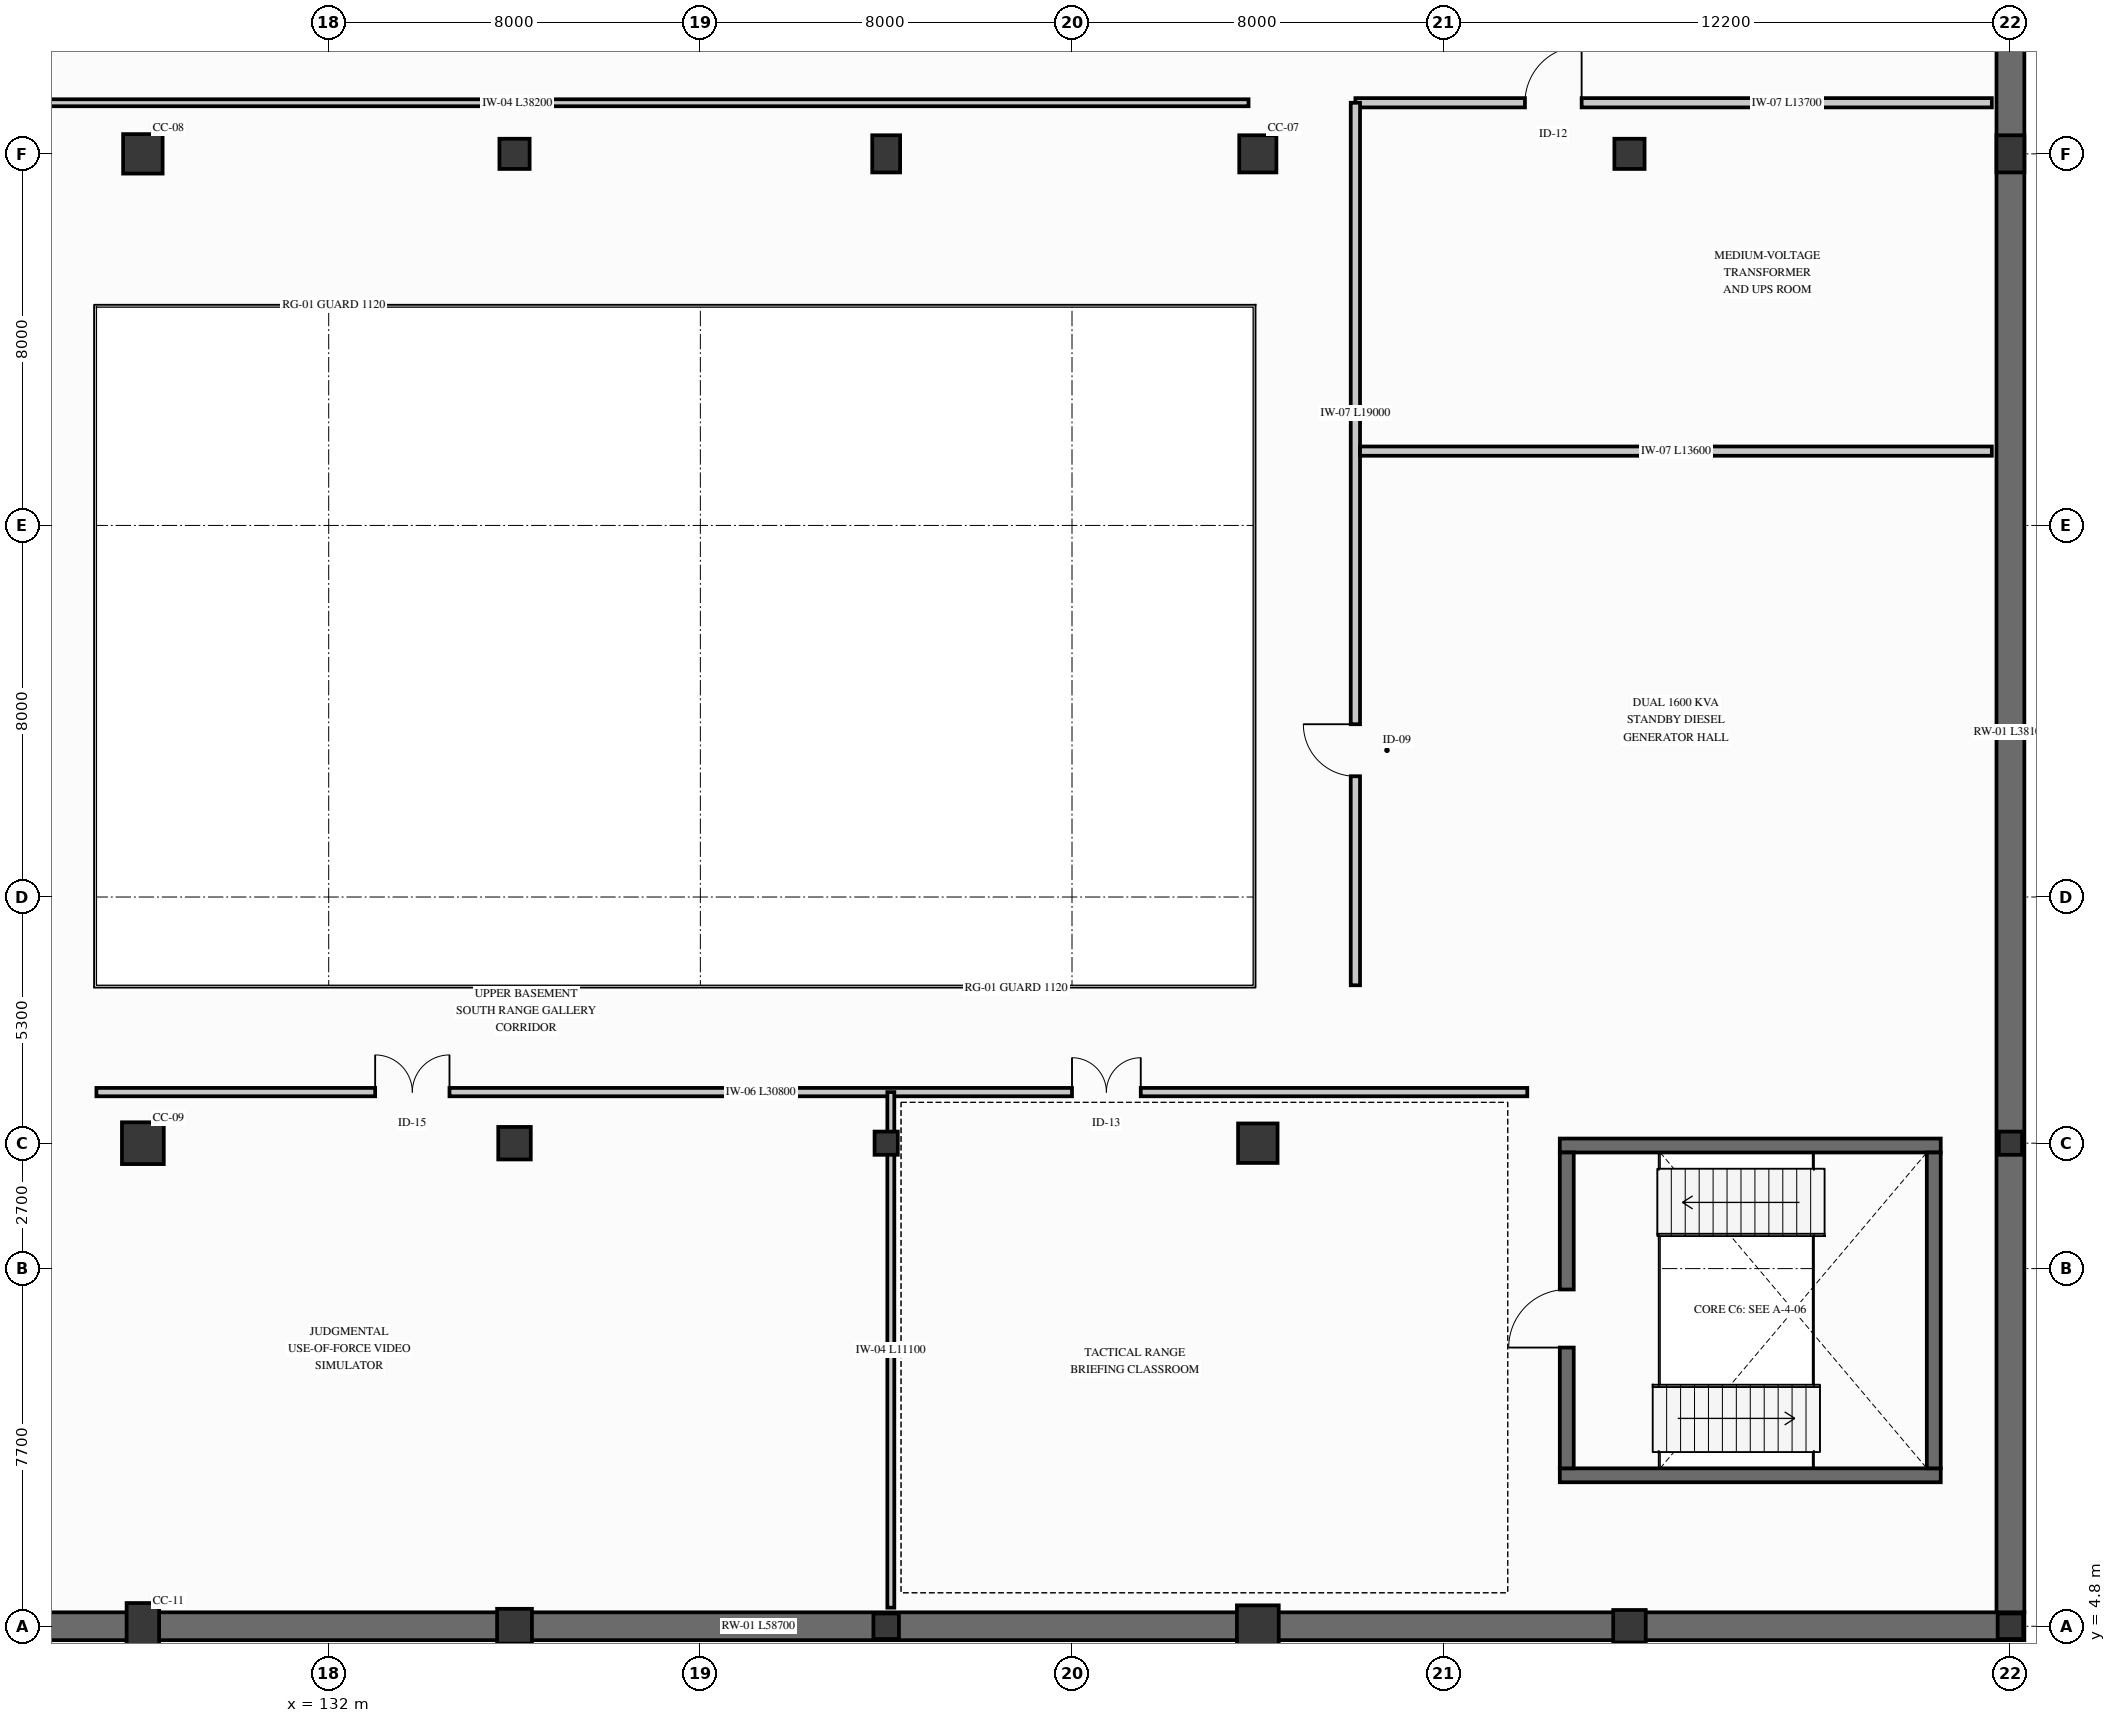
"""IFC4 building model, lengths in metres.
Left out: names, types, materials, properties, quantities, classifications, styles, units other than length and angle.
Written with IfcOpenShell. Run it as: python <this file> out.ifc"""

import sys

from ifc_helpers import new_model, si_unit, direction, frame, frame_2d, origin, origin_2d, place, context, subcontext, project, spatial, rectangle, extrude, element, fill, save


model = new_model("IFC4")
c1 = context("Model", 3, precision=1e-05, world=origin(), true_north=direction((0.0, 1.0)))
c2 = subcontext(c1, "Body", "Model", "MODEL_VIEW")
j1 = project(units=[si_unit("LENGTHUNIT", "METRE"), si_unit("PLANEANGLEUNIT", "RADIAN")], contexts=[c1])
p1 = place(None, origin())
s1 = spatial("IfcSite", under=j1, at=p1, CompositionType="ELEMENT")
p2 = place(p1, origin())
s2 = spatial("IfcBuilding", under=s1, at=p2, CompositionType="ELEMENT")
p3 = place(p2, frame((0.0, 0.0, -4.2)))
s3 = spatial("IfcBuildingStorey", under=s2, at=p3, CompositionType="ELEMENT", Elevation=-4.2)
p4 = place(p3, frame((109.8, 4.8, 0.0), z_axis=(0.0, 0.0, 1.0), x_axis=(1.0, 0.0, 0.0)))
e1 = element("IfcWall", 1, at=p4, inside=s3, PredefinedType="USERDEFINED", context=c2, shape_type="SweptSolid", body=[
    extrude(rectangle(XDim=58.7, YDim=0.6, at=frame_2d((29.35, 0.0))), origin(), (0.0, 0.0, 1.0), 3.94),
])
p5 = place(p3, frame((168.2, 5.1, 0.0), z_axis=(0.0, 0.0, 1.0), x_axis=(0.0, 1.0, 0.0)))
e2 = element("IfcWall", 2, at=p5, inside=s3, PredefinedType="USERDEFINED", context=c2, shape_type="SweptSolid", body=[
    extrude(rectangle(XDim=38.1, YDim=0.6, at=frame_2d((19.05, 0.0))), origin(), (0.0, 0.0, 1.0), 3.94),
])
for number, where, z_axis, x_axis in (
    (3, (158.5, 8.05, 0.0), (0.0, 0.0, 1.0), (1.0, 0.0, 0.0)),
    (4, (158.5, 15.15, 0.0), (0.0, 0.0, 1.0), (1.0, 0.0, 0.0)),
):
    element("IfcWall", number, at=place(p3, frame(where, z_axis=z_axis, x_axis=x_axis)), inside=s3, PredefinedType="SHEAR", context=c2, shape_type="SweptSolid", body=[
        extrude(rectangle(XDim=8.2, YDim=0.3, at=frame_2d((4.1, 0.0))), origin(), (0.0, 0.0, 1.0), 3.9),
    ])
p6 = place(p3, frame((158.65, 8.2, 0.0), z_axis=(0.0, 0.0, 1.0), x_axis=(0.0, 1.0, 0.0)))
e5 = element("IfcWall", 5, at=p6, inside=s3, PredefinedType="SHEAR", context=c2, shape_type="SweptSolid", body=[
    extrude(rectangle(XDim=6.8, YDim=0.3, at=frame_2d((3.4, 0.0))), origin(), (0.0, 0.0, 1.0), 3.9),
])
p7 = place(p6, frame((2.6, 0.0, 0.0)))
e6 = element("IfcOpeningElement", 6, at=p7, cuts=e5, PredefinedType="OPENING", context=c2, shape_type="SweptSolid", body=[
    extrude(rectangle(XDim=1.25, YDim=2.2, at=frame_2d((0.625, 1.1))), frame((0.0, 0.16, 0.0), z_axis=(0.0, -1.0, 0.0), x_axis=(1.0, 0.0, 0.0)), (0.0, 0.0, 1.0), 0.32),
])
p8 = place(p3, frame((166.55, 8.2, 0.0), z_axis=(0.0, 0.0, 1.0), x_axis=(0.0, 1.0, 0.0)))
e7 = element("IfcWall", 7, at=p8, inside=s3, PredefinedType="SHEAR", context=c2, shape_type="SweptSolid", body=[
    extrude(rectangle(XDim=6.8, YDim=0.3, at=frame_2d((3.4, 0.0))), origin(), (0.0, 0.0, 1.0), 3.9),
])
p9 = place(p3, frame((128.0, 4.8, 0.0), z_axis=(0.0, 0.0, 1.0), x_axis=(1.0, 0.0, 0.0)))
e8 = element("IfcColumn", 8, at=p9, inside=s3, PredefinedType="COLUMN", context=c2, shape_type="SweptSolid", body=[
    extrude(rectangle(XDim=0.7, YDim=1.0, at=origin_2d()), origin(), (0.0, 0.0, 1.0), 4.2),
])
p10 = place(p3, frame((128.0, 15.2, 0.0), z_axis=(0.0, 0.0, 1.0), x_axis=(1.0, 0.0, 0.0)))
e9 = element("IfcColumn", 9, at=p10, inside=s3, PredefinedType="COLUMN", context=c2, shape_type="SweptSolid", body=[
    extrude(rectangle(XDim=0.9, YDim=0.9, at=origin_2d()), origin(), (0.0, 0.0, 1.0), 4.2),
])
p11 = place(p3, frame((128.0, 36.5, 0.0), z_axis=(0.0, 0.0, 1.0), x_axis=(1.0, 0.0, 0.0)))
e10 = element("IfcColumn", 10, at=p11, inside=s3, PredefinedType="COLUMN", context=c2, shape_type="SweptSolid", body=[
    extrude(rectangle(XDim=0.85, YDim=0.85, at=origin_2d()), origin(), (0.0, 0.0, 1.0), 4.2),
])
p12 = place(p3, frame((136.0, 4.8, 0.0), z_axis=(0.0, 0.0, 1.0), x_axis=(1.0, 0.0, 0.0)))
e11 = element("IfcColumn", 11, at=p12, inside=s3, PredefinedType="COLUMN", context=c2, shape_type="SweptSolid", body=[
    extrude(rectangle(XDim=0.75, YDim=0.75, at=origin_2d()), origin(), (0.0, 0.0, 1.0), 4.2),
])
p13 = place(p3, frame((136.0, 15.2, 0.0), z_axis=(0.0, 0.0, 1.0), x_axis=(1.0, 0.0, 0.0)))
e12 = element("IfcColumn", 12, at=p13, inside=s3, PredefinedType="COLUMN", context=c2, shape_type="SweptSolid", body=[
    extrude(rectangle(XDim=0.7, YDim=0.7, at=origin_2d()), origin(), (0.0, 0.0, 1.0), 4.2),
])
p14 = place(p3, frame((136.0, 36.5, 0.0), z_axis=(0.0, 0.0, 1.0), x_axis=(1.0, 0.0, 0.0)))
e13 = element("IfcColumn", 13, at=p14, inside=s3, PredefinedType="COLUMN", context=c2, shape_type="SweptSolid", body=[
    extrude(rectangle(XDim=0.65, YDim=0.65, at=origin_2d()), origin(), (0.0, 0.0, 1.0), 4.2),
])
p15 = place(p3, frame((144.0, 4.8, 0.0), z_axis=(0.0, 0.0, 1.0), x_axis=(1.0, 0.0, 0.0)))
e14 = element("IfcColumn", 14, at=p15, inside=s3, PredefinedType="COLUMN", context=c2, shape_type="SweptSolid", body=[
    extrude(rectangle(XDim=0.55, YDim=0.55, at=origin_2d()), origin(), (0.0, 0.0, 1.0), 4.2),
])
p16 = place(p3, frame((144.0, 15.2, 0.0), z_axis=(0.0, 0.0, 1.0), x_axis=(1.0, 0.0, 0.0)))
e15 = element("IfcColumn", 15, at=p16, inside=s3, PredefinedType="COLUMN", context=c2, shape_type="SweptSolid", body=[
    extrude(rectangle(XDim=0.5, YDim=0.5, at=origin_2d()), origin(), (0.0, 0.0, 1.0), 4.2),
])
p17 = place(p3, frame((144.0, 36.5, 0.0), z_axis=(0.0, 0.0, 1.0), x_axis=(1.0, 0.0, 0.0)))
e16 = element("IfcColumn", 16, at=p17, inside=s3, PredefinedType="COLUMN", context=c2, shape_type="SweptSolid", body=[
    extrude(rectangle(XDim=0.6, YDim=0.8, at=origin_2d()), origin(), (0.0, 0.0, 1.0), 4.2),
])
p18 = place(p3, frame((152.0, 4.8, 0.0), z_axis=(0.0, 0.0, 1.0), x_axis=(1.0, 0.0, 0.0)))
e17 = element("IfcColumn", 17, at=p18, inside=s3, PredefinedType="COLUMN", context=c2, shape_type="SweptSolid", body=[
    extrude(rectangle(XDim=0.9, YDim=0.9, at=origin_2d()), origin(), (0.0, 0.0, 1.0), 4.2),
])
p19 = place(p3, frame((152.0, 15.2, 0.0), z_axis=(0.0, 0.0, 1.0), x_axis=(1.0, 0.0, 0.0)))
e18 = element("IfcColumn", 18, at=p19, inside=s3, PredefinedType="COLUMN", context=c2, shape_type="SweptSolid", body=[
    extrude(rectangle(XDim=0.85, YDim=0.85, at=origin_2d()), origin(), (0.0, 0.0, 1.0), 4.2),
])
p20 = place(p3, frame((152.0, 36.5, 0.0), z_axis=(0.0, 0.0, 1.0), x_axis=(1.0, 0.0, 0.0)))
e19 = element("IfcColumn", 19, at=p20, inside=s3, PredefinedType="COLUMN", context=c2, shape_type="SweptSolid", body=[
    extrude(rectangle(XDim=0.8, YDim=0.8, at=origin_2d()), origin(), (0.0, 0.0, 1.0), 4.2),
])
p21 = place(p3, frame((160.0, 4.8, 0.0), z_axis=(0.0, 0.0, 1.0), x_axis=(1.0, 0.0, 0.0)))
e20 = element("IfcColumn", 20, at=p21, inside=s3, PredefinedType="COLUMN", context=c2, shape_type="SweptSolid", body=[
    extrude(rectangle(XDim=0.7, YDim=0.7, at=origin_2d()), origin(), (0.0, 0.0, 1.0), 4.2),
])
p22 = place(p3, frame((160.0, 36.5, 0.0), z_axis=(0.0, 0.0, 1.0), x_axis=(1.0, 0.0, 0.0)))
e21 = element("IfcColumn", 21, at=p22, inside=s3, PredefinedType="COLUMN", context=c2, shape_type="SweptSolid", body=[
    extrude(rectangle(XDim=0.65, YDim=0.65, at=origin_2d()), origin(), (0.0, 0.0, 1.0), 4.2),
])
p23 = place(p3, frame((168.2, 4.8, 0.0), z_axis=(0.0, 0.0, 1.0), x_axis=(1.0, 0.0, 0.0)))
e22 = element("IfcColumn", 22, at=p23, inside=s3, PredefinedType="COLUMN", context=c2, shape_type="SweptSolid", body=[
    extrude(rectangle(XDim=0.55, YDim=0.55, at=origin_2d()), origin(), (0.0, 0.0, 1.0), 4.2),
])
p24 = place(p3, frame((168.2, 15.2, 0.0), z_axis=(0.0, 0.0, 1.0), x_axis=(1.0, 0.0, 0.0)))
e23 = element("IfcColumn", 23, at=p24, inside=s3, PredefinedType="COLUMN", context=c2, shape_type="SweptSolid", body=[
    extrude(rectangle(XDim=0.5, YDim=0.5, at=origin_2d()), origin(), (0.0, 0.0, 1.0), 4.2),
])
p25 = place(p3, frame((168.2, 36.5, 0.0), z_axis=(0.0, 0.0, 1.0), x_axis=(1.0, 0.0, 0.0)))
e24 = element("IfcColumn", 24, at=p25, inside=s3, PredefinedType="COLUMN", context=c2, shape_type="SweptSolid", body=[
    extrude(rectangle(XDim=0.6, YDim=0.8, at=origin_2d()), origin(), (0.0, 0.0, 1.0), 4.2),
])
p26 = place(p3, frame((113.6, 37.6, 0.0), z_axis=(0.0, 0.0, 1.0), x_axis=(1.0, 0.0, 0.0)))
e25 = element("IfcWall", 25, at=p26, inside=s3, PredefinedType="PARTITIONING", context=c2, shape_type="SweptSolid", body=[
    extrude(rectangle(XDim=38.2, YDim=0.15, at=frame_2d((19.1, 0.0))), origin(), (0.0, 0.0, 1.0), 3.088),
])
p27 = place(p26, frame((1.8, 0.0, 0.0)))
e26 = element("IfcOpeningElement", 26, at=p27, cuts=e25, PredefinedType="OPENING", context=c2, shape_type="SweptSolid", body=[
    extrude(rectangle(XDim=0.88, YDim=2.1, at=frame_2d((0.44, 1.05))), frame((0.0, 0.085, 0.0), z_axis=(0.0, -1.0, 0.0), x_axis=(1.0, 0.0, 0.0)), (0.0, 0.0, 1.0), 0.17),
])
p28 = place(p26, frame((5.8, 0.0, 0.0)))
e27 = element("IfcOpeningElement", 27, at=p28, cuts=e25, PredefinedType="OPENING", context=c2, shape_type="SweptSolid", body=[
    extrude(rectangle(XDim=0.92, YDim=2.12, at=frame_2d((0.46, 1.06))), frame((0.0, 0.085, 0.0), z_axis=(0.0, -1.0, 0.0), x_axis=(1.0, 0.0, 0.0)), (0.0, 0.0, 1.0), 0.17),
])
p29 = place(p3, frame((154.1, 37.6, 0.0), z_axis=(0.0, 0.0, 1.0), x_axis=(1.0, 0.0, 0.0)))
e28 = element("IfcWall", 28, at=p29, inside=s3, PredefinedType="PARTITIONING", context=c2, shape_type="SweptSolid", body=[
    extrude(rectangle(XDim=13.7, YDim=0.2, at=frame_2d((6.85, 0.0))), origin(), (0.0, 0.0, 1.0), 3.088),
])
p30 = place(p29, frame((3.65, 0.0, 0.0)))
e29 = element("IfcOpeningElement", 29, at=p30, cuts=e28, PredefinedType="OPENING", context=c2, shape_type="SweptSolid", body=[
    extrude(rectangle(XDim=1.22, YDim=2.25, at=frame_2d((0.61, 1.125))), frame((0.0, 0.11, 0.0), z_axis=(0.0, -1.0, 0.0), x_axis=(1.0, 0.0, 0.0)), (0.0, 0.0, 1.0), 0.22),
])
p31 = place(p3, frame((127.0, 16.3, 0.0), z_axis=(0.0, 0.0, 1.0), x_axis=(1.0, 0.0, 0.0)))
e30 = element("IfcWall", 30, at=p31, inside=s3, PredefinedType="PARTITIONING", context=c2, shape_type="SweptSolid", body=[
    extrude(rectangle(XDim=30.8, YDim=0.18, at=frame_2d((15.4, 0.0))), origin(), (0.0, 0.0, 1.0), 3.088),
])
p32 = place(p31, frame((6.0, 0.0, 0.0)))
e31 = element("IfcOpeningElement", 31, at=p32, cuts=e30, PredefinedType="OPENING", context=c2, shape_type="SweptSolid", body=[
    extrude(rectangle(XDim=1.6, YDim=2.3, at=frame_2d((0.8, 1.15))), frame((0.0, 0.1, 0.0), z_axis=(0.0, -1.0, 0.0), x_axis=(1.0, 0.0, 0.0)), (0.0, 0.0, 1.0), 0.2),
])
p33 = place(p31, frame((21.0, 0.0, 0.0)))
e32 = element("IfcOpeningElement", 32, at=p33, cuts=e30, PredefinedType="OPENING", context=c2, shape_type="SweptSolid", body=[
    extrude(rectangle(XDim=1.48, YDim=2.28, at=frame_2d((0.74, 1.14))), frame((0.0, 0.1, 0.0), z_axis=(0.0, -1.0, 0.0), x_axis=(1.0, 0.0, 0.0)), (0.0, 0.0, 1.0), 0.2),
])
p34 = place(p3, frame((144.1, 5.2, 0.0), z_axis=(0.0, 0.0, 1.0), x_axis=(0.0, 1.0, 0.0)))
e33 = element("IfcWall", 33, at=p34, inside=s3, PredefinedType="PARTITIONING", context=c2, shape_type="SweptSolid", body=[
    extrude(rectangle(XDim=11.1, YDim=0.15, at=frame_2d((5.55, 0.0))), origin(), (0.0, 0.0, 1.0), 3.09),
])
p35 = place(p3, frame((154.1, 18.6, 0.0), z_axis=(0.0, 0.0, 1.0), x_axis=(0.0, 1.0, 0.0)))
e34 = element("IfcWall", 34, at=p35, inside=s3, PredefinedType="PARTITIONING", context=c2, shape_type="SweptSolid", body=[
    extrude(rectangle(XDim=19.0, YDim=0.2, at=frame_2d((9.5, 0.0))), origin(), (0.0, 0.0, 1.0), 3.188),
])
p36 = place(p35, frame((4.5, 0.0, 0.0)))
e35 = element("IfcOpeningElement", 35, at=p36, cuts=e34, PredefinedType="OPENING", context=c2, shape_type="SweptSolid", body=[
    extrude(rectangle(XDim=1.12, YDim=2.2, at=frame_2d((0.56, 1.1))), frame((0.0, 0.11, 0.0), z_axis=(0.0, -1.0, 0.0), x_axis=(1.0, 0.0, 0.0)), (0.0, 0.0, 1.0), 0.22),
])
p37 = place(p3, frame((154.2, 30.1, 0.0), z_axis=(0.0, 0.0, 1.0), x_axis=(1.0, 0.0, 0.0)))
e36 = element("IfcWall", 36, at=p37, inside=s3, PredefinedType="PARTITIONING", context=c2, shape_type="SweptSolid", body=[
    extrude(rectangle(XDim=13.6, YDim=0.2, at=frame_2d((6.8, 0.0))), origin(), (0.0, 0.0, 1.0), 3.088),
])
p38 = place(p7, origin())
e37 = element("IfcDoor", 37, at=p38, inside=s3, OperationType="SINGLE_SWING_LEFT", PredefinedType="DOOR", context=c2, shape_type="SweptSolid", body=[
    extrude(rectangle(XDim=1.25, YDim=2.2, at=frame_2d((0.625, 1.1))), frame((0.0, 0.025, 0.0), z_axis=(0.0, -1.0, 0.0), x_axis=(1.0, 0.0, 0.0)), (0.0, 0.0, 1.0), 0.05),
])
fill(e6, e37)
p39 = place(p30, origin())
e38 = element("IfcDoor", 38, at=p39, inside=s3, OperationType="SINGLE_SWING_RIGHT", PredefinedType="DOOR", context=c2, shape_type="SweptSolid", body=[
    extrude(rectangle(XDim=1.22, YDim=2.25, at=frame_2d((0.61, 1.125))), frame((0.0, 0.025, 0.0), z_axis=(0.0, -1.0, 0.0), x_axis=(1.0, 0.0, 0.0)), (0.0, 0.0, 1.0), 0.05),
])
fill(e29, e38)
p40 = place(p32, origin())
e39 = element("IfcDoor", 39, at=p40, inside=s3, OperationType="DOUBLE_DOOR_SINGLE_SWING", PredefinedType="DOOR", context=c2, shape_type="SweptSolid", body=[
    extrude(rectangle(XDim=1.6, YDim=2.3, at=frame_2d((0.8, 1.15))), frame((0.0, 0.025, 0.0), z_axis=(0.0, -1.0, 0.0), x_axis=(1.0, 0.0, 0.0)), (0.0, 0.0, 1.0), 0.05),
])
fill(e31, e39)
p41 = place(p33, origin())
e40 = element("IfcDoor", 40, at=p41, inside=s3, OperationType="DOUBLE_DOOR_SINGLE_SWING", PredefinedType="DOOR", context=c2, shape_type="SweptSolid", body=[
    extrude(rectangle(XDim=1.48, YDim=2.28, at=frame_2d((0.74, 1.14))), frame((0.0, 0.025, 0.0), z_axis=(0.0, -1.0, 0.0), x_axis=(1.0, 0.0, 0.0)), (0.0, 0.0, 1.0), 0.05),
])
fill(e32, e40)
p42 = place(p36, origin())
e41 = element("IfcDoor", 41, at=p42, inside=s3, OperationType="SINGLE_SWING_RIGHT", PredefinedType="DOOR", context=c2, shape_type="SweptSolid", body=[
    extrude(rectangle(XDim=1.12, YDim=2.2, at=frame_2d((0.56, 1.1))), frame((0.0, 0.025, 0.0), z_axis=(0.0, -1.0, 0.0), x_axis=(1.0, 0.0, 0.0)), (0.0, 0.0, 1.0), 0.05),
])
fill(e35, e41)
save(model, sys.argv[1])
